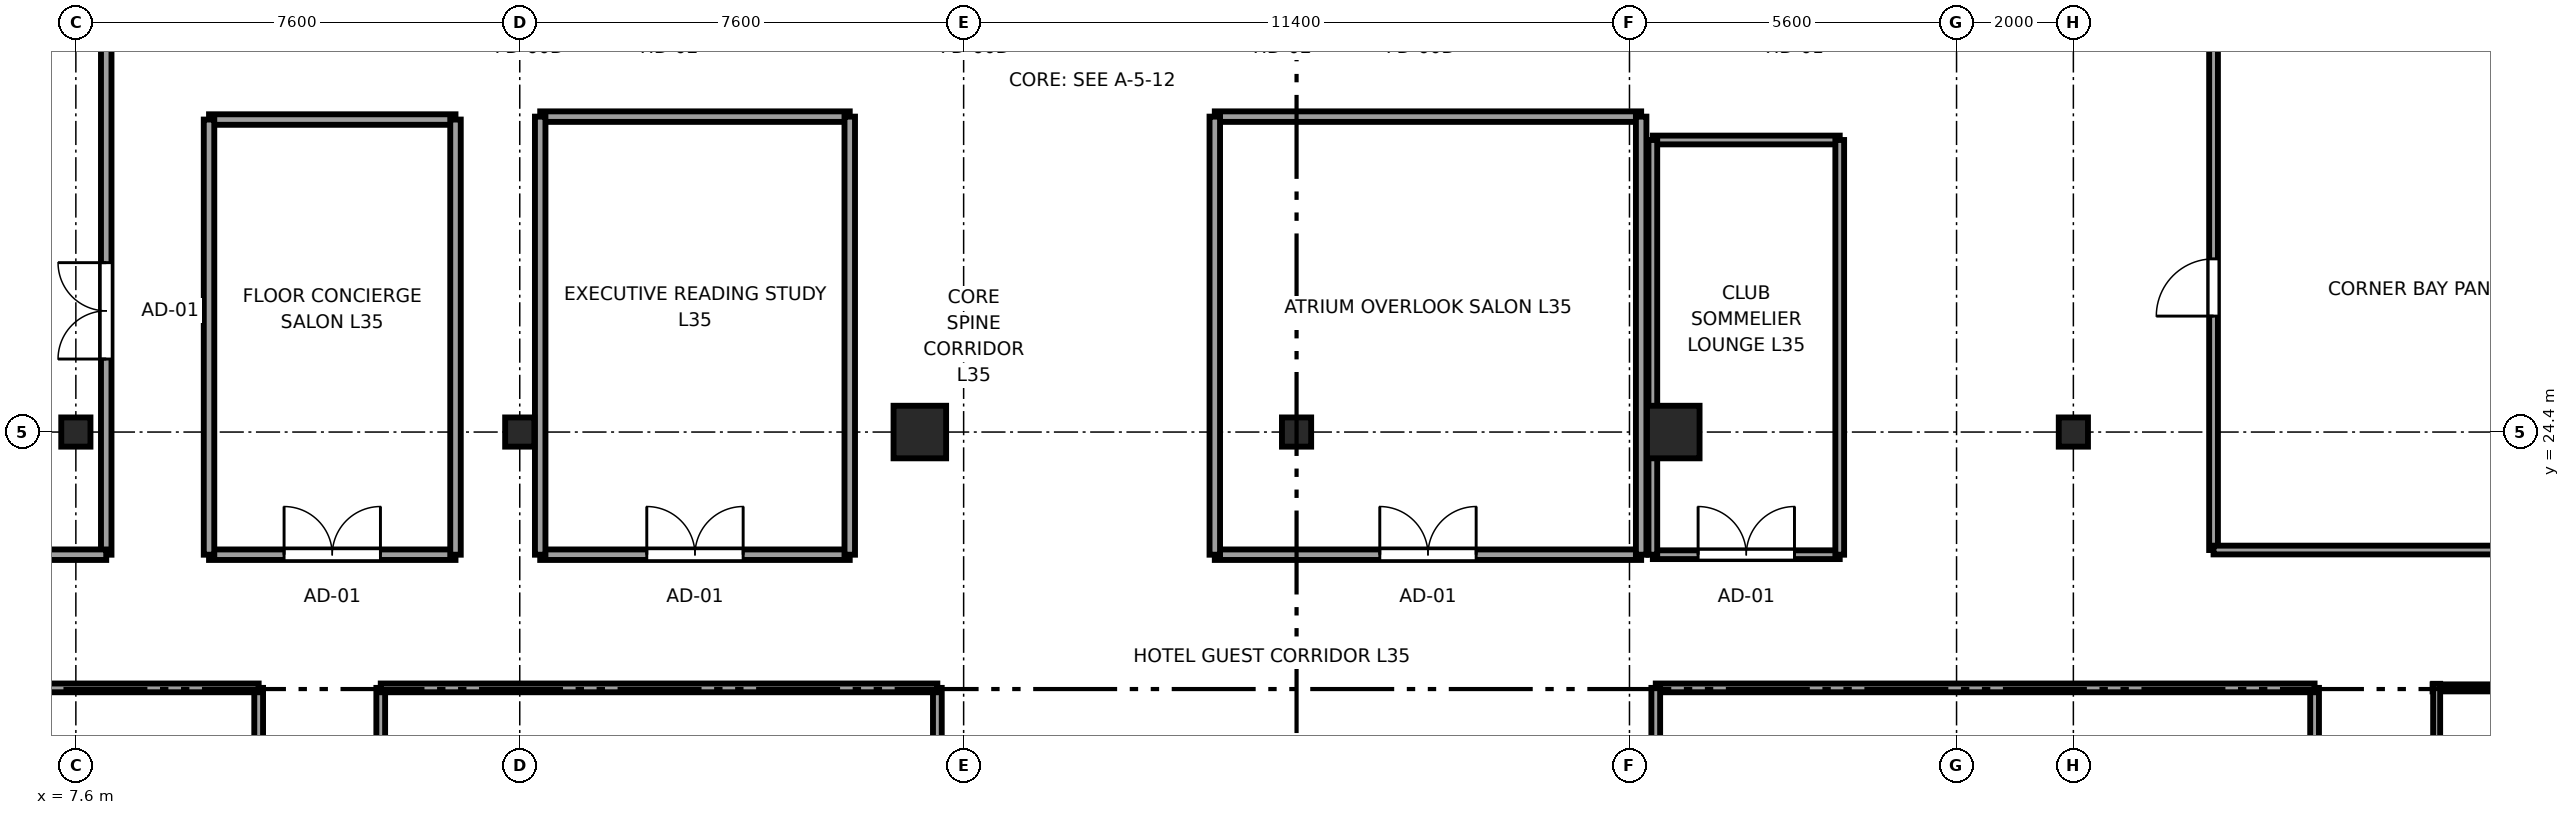
"""IFC4 building model, lengths in metres.
Left out: names, types, materials, properties, quantities, classifications, styles, units other than length and angle.
Written with IfcOpenShell. Run it as: python <this file> out.ifc"""

import sys

from ifc_helpers import new_model, si_unit, direction, frame, frame_2d, origin, origin_2d, place, context, subcontext, project, spatial, rectangle, i_section, extrude, source, transform, mapped, element, fill, save


model = new_model("IFC4")
c1 = context("Model", 3, precision=1e-05, world=origin(), true_north=direction((0.0, 1.0)))
c2 = subcontext(c1, "Body", "Model", "MODEL_VIEW")
j1 = project(units=[si_unit("LENGTHUNIT", "METRE"), si_unit("PLANEANGLEUNIT", "RADIAN")], contexts=[c1])
p1 = place(None, origin())
s1 = spatial("IfcSite", under=j1, at=p1, CompositionType="ELEMENT")
p2 = place(p1, origin())
s2 = spatial("IfcBuilding", under=s1, at=p2, CompositionType="ELEMENT")
p3 = place(p2, frame((0.0, 0.0, 136.4)))
s3 = spatial("IfcBuildingStorey", under=s2, at=p3, CompositionType="ELEMENT", Elevation=136.4)
m1 = source(origin(), c2, "Body", "SweptSolid", [
    extrude(i_section(OverallWidth=0.5, OverallDepth=0.5, WebThickness=0.022, FlangeThickness=0.034, at=origin_2d()), origin(), (0.0, 0.0, 1.0), 3.55),
])
for number, where, z_axis, x_axis in (
    (1, (7.6, 24.4, 0.0), (0.0, 0.0, 1.0), (1.0, 0.0, 0.0)),
    (2, (15.2, 24.4, 0.0), (0.0, 0.0, 1.0), (1.0, 0.0, 0.0)),
):
    element("IfcColumn", number, at=place(p3, frame(where, z_axis=z_axis, x_axis=x_axis)), inside=s3, PredefinedType="COLUMN", context=c2, shape_type="MappedRepresentation", body=[
        mapped(m1, transform((0.0, 0.0, 0.0), x_axis=(1.0, 0.0, 0.0), y_axis=(0.0, 1.0, 0.0), z_axis=(0.0, 0.0, 1.0), scale=1.0)),
    ])
m2 = source(origin(), c2, "Body", "SweptSolid", [
    extrude(rectangle(XDim=0.9, YDim=0.9, at=origin_2d()), origin(), (0.0, 0.0, 1.0), 3.55),
])
for number, where, z_axis, x_axis in (
    (3, (22.05, 24.4, 0.0), (0.0, 0.0, 1.0), (1.0, 0.0, 0.0)),
    (4, (34.95, 24.4, 0.0), (0.0, 0.0, 1.0), (1.0, 0.0, 0.0)),
):
    element("IfcColumn", number, at=place(p3, frame(where, z_axis=z_axis, x_axis=x_axis)), inside=s3, PredefinedType="COLUMN", context=c2, shape_type="MappedRepresentation", body=[
        mapped(m2, transform((0.0, 0.0, 0.0), x_axis=(1.0, 0.0, 0.0), y_axis=(0.0, 1.0, 0.0), z_axis=(0.0, 0.0, 1.0), scale=1.0)),
    ])
for number, where, z_axis, x_axis in (
    (5, (41.8, 24.4, 0.0), (0.0, 0.0, 1.0), (1.0, 0.0, 0.0)),
    (6, (28.5, 24.4, 0.0), (0.0, 0.0, 1.0), (1.0, 0.0, 0.0)),
):
    element("IfcColumn", number, at=place(p3, frame(where, z_axis=z_axis, x_axis=x_axis)), inside=s3, PredefinedType="COLUMN", context=c2, shape_type="MappedRepresentation", body=[
        mapped(m1, transform((0.0, 0.0, 0.0), x_axis=(1.0, 0.0, 0.0), y_axis=(0.0, 1.0, 0.0), z_axis=(0.0, 0.0, 1.0), scale=1.0)),
    ])
p4 = place(p3, frame((47.95, 20.02, 0.0), z_axis=(0.0, 0.0, 1.0), x_axis=(1.0, 0.0, 0.0)))
e7 = element("IfcWall", 7, at=p4, inside=s3, PredefinedType="PLUMBINGWALL", context=c2, shape_type="SweptSolid", body=[
    extrude(rectangle(XDim=2.59, YDim=0.12, at=frame_2d((1.295, 0.0))), origin(), (0.0, 0.0, 1.0), 3.37),
])
p5 = place(p3, frame((48.02, 17.997, 0.0), z_axis=(0.0, 0.0, 1.0), x_axis=(0.0, 1.0, 0.0)))
e8 = element("IfcWall", 8, at=p5, inside=s3, PredefinedType="PLUMBINGWALL", context=c2, shape_type="SweptSolid", body=[
    extrude(rectangle(XDim=2.093, YDim=0.12, at=frame_2d((1.046, 0.0))), origin(), (0.0, 0.0, 1.0), 3.37),
])
p6 = place(p3, frame((10.73, 17.037, 0.0), z_axis=(0.0, 0.0, 1.0), x_axis=(0.0, 1.0, 0.0)))
e9 = element("IfcWall", 9, at=p6, inside=s3, PredefinedType="PARTITIONING", context=c2, shape_type="SweptSolid", body=[
    extrude(rectangle(XDim=2.983, YDim=0.15, at=frame_2d((1.491, 0.0))), origin(), (0.0, 0.0, 1.0), 3.37),
])
p7 = place(p6, frame((0.981, 0.0, 0.0)))
e10 = element("IfcOpeningElement", 10, at=p7, cuts=e9, PredefinedType="OPENING", context=c2, shape_type="SweptSolid", body=[
    extrude(rectangle(XDim=0.98, YDim=2.12, at=frame_2d((0.49, 1.06))), frame((0.0, 0.085, 0.0), z_axis=(0.0, -1.0, 0.0), x_axis=(1.0, 0.0, 0.0)), (0.0, 0.0, 1.0), 0.17),
])
p8 = place(p3, frame((0.405, 20.02, 0.0), z_axis=(0.0, 0.0, 1.0), x_axis=(1.0, 0.0, 0.0)))
e11 = element("IfcWall", 11, at=p8, inside=s3, PredefinedType="PARTITIONING", context=c2, shape_type="SweptSolid", body=[
    extrude(rectangle(XDim=10.325, YDim=0.15, at=frame_2d((5.163, 0.0))), origin(), (0.0, 0.0, 1.0), 3.37),
])
p9 = place(p3, frame((12.82, 15.81, 0.0), z_axis=(0.0, 0.0, 1.0), x_axis=(0.0, 1.0, 0.0)))
e12 = element("IfcWall", 12, at=p9, inside=s3, PredefinedType="PARTITIONING", context=c2, shape_type="SweptSolid", body=[
    extrude(rectangle(XDim=4.21, YDim=0.15, at=frame_2d((2.105, 0.0))), origin(), (0.0, 0.0, 1.0), 3.37),
])
p10 = place(p9, frame((1.595, 0.0, 0.0)))
e13 = element("IfcOpeningElement", 13, at=p10, cuts=e12, PredefinedType="OPENING", context=c2, shape_type="SweptSolid", body=[
    extrude(rectangle(XDim=0.98, YDim=2.12, at=frame_2d((0.49, 1.06))), frame((0.0, 0.085, 0.0), z_axis=(0.0, -1.0, 0.0), x_axis=(1.0, 0.0, 0.0)), (0.0, 0.0, 1.0), 0.17),
])
p11 = place(p3, frame((22.35, 13.48, 0.0), z_axis=(0.0, 0.0, 1.0), x_axis=(0.0, 1.0, 0.0)))
e14 = element("IfcWall", 14, at=p11, inside=s3, PredefinedType="PARTITIONING", context=c2, shape_type="SweptSolid", body=[
    extrude(rectangle(XDim=6.54, YDim=0.15, at=frame_2d((3.27, 0.0))), origin(), (0.0, 0.0, 1.0), 3.37),
])
p12 = place(p3, frame((12.82, 20.02, 0.0), z_axis=(0.0, 0.0, 1.0), x_axis=(1.0, 0.0, 0.0)))
e15 = element("IfcWall", 15, at=p12, inside=s3, PredefinedType="PARTITIONING", context=c2, shape_type="SweptSolid", body=[
    extrude(rectangle(XDim=9.53, YDim=0.15, at=frame_2d((4.765, 0.0))), origin(), (0.0, 0.0, 1.0), 2.954),
])
p13 = place(p3, frame((45.93, 15.81, 0.0), z_axis=(0.0, 0.0, 1.0), x_axis=(0.0, 1.0, 0.0)))
e16 = element("IfcWall", 16, at=p13, inside=s3, PredefinedType="PARTITIONING", context=c2, shape_type="SweptSolid", body=[
    extrude(rectangle(XDim=4.21, YDim=0.15, at=frame_2d((2.105, 0.0))), origin(), (0.0, 0.0, 1.0), 3.37),
])
p14 = place(p13, frame((1.595, 0.0, 0.0)))
e17 = element("IfcOpeningElement", 17, at=p14, cuts=e16, PredefinedType="OPENING", context=c2, shape_type="SweptSolid", body=[
    extrude(rectangle(XDim=0.98, YDim=2.12, at=frame_2d((0.49, 1.06))), frame((0.0, 0.085, 0.0), z_axis=(0.0, -1.0, 0.0), x_axis=(1.0, 0.0, 0.0)), (0.0, 0.0, 1.0), 0.17),
])
p15 = place(p3, frame((34.65, 20.02, 0.0), z_axis=(0.0, 0.0, 1.0), x_axis=(1.0, 0.0, 0.0)))
e18 = element("IfcWall", 18, at=p15, inside=s3, PredefinedType="PARTITIONING", context=c2, shape_type="SweptSolid", body=[
    extrude(rectangle(XDim=11.28, YDim=0.15, at=frame_2d((5.64, 0.0))), origin(), (0.0, 0.0, 1.0), 2.954),
])
p16 = place(p3, frame((34.65, 13.48, 0.0), z_axis=(0.0, 0.0, 1.0), x_axis=(0.0, 1.0, 0.0)))
e19 = element("IfcWall", 19, at=p16, inside=s3, PredefinedType="PARTITIONING", context=c2, shape_type="SweptSolid", body=[
    extrude(rectangle(XDim=6.54, YDim=0.15, at=frame_2d((3.27, 0.0))), origin(), (0.0, 0.0, 1.0), 3.37),
])
p17 = place(p3, frame((8.12, 22.3, 0.0), z_axis=(0.0, 0.0, 1.0), x_axis=(0.0, 1.0, 0.0)))
e20 = element("IfcWall", 20, at=p17, inside=s3, PredefinedType="PARTITIONING", context=c2, shape_type="SweptSolid", body=[
    extrude(rectangle(XDim=13.5, YDim=0.18, at=frame_2d((6.75, 0.0))), origin(), (0.0, 0.0, 1.0), 3.37),
])
p18 = place(p17, frame((3.35, 0.0, 0.0)))
e21 = element("IfcOpeningElement", 21, at=p18, cuts=e20, PredefinedType="OPENING", context=c2, shape_type="SweptSolid", body=[
    extrude(rectangle(XDim=1.65, YDim=2.15, at=frame_2d((0.825, 1.075))), frame((0.0, 0.1, 0.0), z_axis=(0.0, -1.0, 0.0), x_axis=(1.0, 0.0, 0.0)), (0.0, 0.0, 1.0), 0.2),
])
p19 = place(p3, frame((0.405, 22.3, 0.0), z_axis=(0.0, 0.0, 1.0), x_axis=(1.0, 0.0, 0.0)))
e22 = element("IfcWall", 22, at=p19, inside=s3, PredefinedType="PARTITIONING", context=c2, shape_type="SweptSolid", body=[
    extrude(rectangle(XDim=7.715, YDim=0.18, at=frame_2d((3.857, 0.0))), origin(), (0.0, 0.0, 1.0), 3.37),
])
p20 = place(p3, frame((44.2, 22.38, 0.0), z_axis=(0.0, 0.0, 1.0), x_axis=(0.0, 1.0, 0.0)))
e23 = element("IfcWall", 23, at=p20, inside=s3, PredefinedType="PARTITIONING", context=c2, shape_type="SweptSolid", body=[
    extrude(rectangle(XDim=8.99, YDim=0.15, at=frame_2d((4.495, 0.0))), origin(), (0.0, 0.0, 1.0), 3.37),
])
p21 = place(p20, frame((4.005, 0.0, 0.0)))
e24 = element("IfcOpeningElement", 24, at=p21, cuts=e23, PredefinedType="OPENING", context=c2, shape_type="SweptSolid", body=[
    extrude(rectangle(XDim=0.98, YDim=2.12, at=frame_2d((0.49, 1.06))), frame((0.0, 0.085, 0.0), z_axis=(0.0, -1.0, 0.0), x_axis=(1.0, 0.0, 0.0)), (0.0, 0.0, 1.0), 0.17),
])
p22 = place(p3, frame((44.2, 22.38, 0.0), z_axis=(0.0, 0.0, 1.0), x_axis=(1.0, 0.0, 0.0)))
e25 = element("IfcWall", 25, at=p22, inside=s3, PredefinedType="PARTITIONING", context=c2, shape_type="SweptSolid", body=[
    extrude(rectangle(XDim=12.395, YDim=0.15, at=frame_2d((6.198, 0.0))), origin(), (0.0, 0.0, 1.0), 3.37),
])
p23 = place(p3, frame((9.88, 22.3, 0.0), z_axis=(0.0, 0.0, 1.0), x_axis=(1.0, 0.0, 0.0)))
e26 = element("IfcWall", 26, at=p23, inside=s3, PredefinedType="PARTITIONING", context=c2, shape_type="SweptSolid", body=[
    extrude(rectangle(XDim=4.22, YDim=0.18, at=frame_2d((2.11, 0.0))), origin(), (0.0, 0.0, 1.0), 3.37),
])
p24 = place(p23, frame((1.285, 0.0, 0.0)))
e27 = element("IfcOpeningElement", 27, at=p24, cuts=e26, PredefinedType="OPENING", context=c2, shape_type="SweptSolid", body=[
    extrude(rectangle(XDim=1.65, YDim=2.15, at=frame_2d((0.825, 1.075))), frame((0.0, 0.1, 0.0), z_axis=(0.0, -1.0, 0.0), x_axis=(1.0, 0.0, 0.0)), (0.0, 0.0, 1.0), 0.2),
])
p25 = place(p3, frame((9.88, 29.75, 0.0), z_axis=(0.0, 0.0, 1.0), x_axis=(1.0, 0.0, 0.0)))
e28 = element("IfcWall", 28, at=p25, inside=s3, PredefinedType="PARTITIONING", context=c2, shape_type="SweptSolid", body=[
    extrude(rectangle(XDim=4.22, YDim=0.18, at=frame_2d((2.11, 0.0))), origin(), (0.0, 0.0, 1.0), 3.37),
])
for number, where, z_axis, x_axis in (
    (29, (9.88, 22.3, 0.0), (0.0, 0.0, 1.0), (0.0, 1.0, 0.0)),
    (30, (14.1, 22.3, 0.0), (0.0, 0.0, 1.0), (0.0, 1.0, 0.0)),
):
    element("IfcWall", number, at=place(p3, frame(where, z_axis=z_axis, x_axis=x_axis)), inside=s3, PredefinedType="PARTITIONING", context=c2, shape_type="SweptSolid", body=[
        extrude(rectangle(XDim=7.45, YDim=0.18, at=frame_2d((3.725, 0.0))), origin(), (0.0, 0.0, 1.0), 3.37),
    ])
p26 = place(p3, frame((27.1, 22.3, 0.0), z_axis=(0.0, 0.0, 1.0), x_axis=(1.0, 0.0, 0.0)))
e31 = element("IfcWall", 31, at=p26, inside=s3, PredefinedType="PARTITIONING", context=c2, shape_type="SweptSolid", body=[
    extrude(rectangle(XDim=7.3, YDim=0.18, at=frame_2d((3.65, 0.0))), origin(), (0.0, 0.0, 1.0), 3.37),
])
p27 = place(p26, frame((2.825, 0.0, 0.0)))
e32 = element("IfcOpeningElement", 32, at=p27, cuts=e31, PredefinedType="OPENING", context=c2, shape_type="SweptSolid", body=[
    extrude(rectangle(XDim=1.65, YDim=2.15, at=frame_2d((0.825, 1.075))), frame((0.0, 0.1, 0.0), z_axis=(0.0, -1.0, 0.0), x_axis=(1.0, 0.0, 0.0)), (0.0, 0.0, 1.0), 0.2),
])
p28 = place(p3, frame((27.1, 29.8, 0.0), z_axis=(0.0, 0.0, 1.0), x_axis=(1.0, 0.0, 0.0)))
e33 = element("IfcWall", 33, at=p28, inside=s3, PredefinedType="PARTITIONING", context=c2, shape_type="SweptSolid", body=[
    extrude(rectangle(XDim=7.3, YDim=0.18, at=frame_2d((3.65, 0.0))), origin(), (0.0, 0.0, 1.0), 3.37),
])
for number, where, z_axis, x_axis in (
    (34, (27.1, 22.3, 0.0), (0.0, 0.0, 1.0), (0.0, 1.0, 0.0)),
    (35, (34.4, 22.3, 0.0), (0.0, 0.0, 1.0), (0.0, 1.0, 0.0)),
):
    element("IfcWall", number, at=place(p3, frame(where, z_axis=z_axis, x_axis=x_axis)), inside=s3, PredefinedType="PARTITIONING", context=c2, shape_type="SweptSolid", body=[
        extrude(rectangle(XDim=7.5, YDim=0.18, at=frame_2d((3.75, 0.0))), origin(), (0.0, 0.0, 1.0), 3.37),
    ])
p29 = place(p3, frame((15.55, 22.3, 0.0), z_axis=(0.0, 0.0, 1.0), x_axis=(1.0, 0.0, 0.0)))
e36 = element("IfcWall", 36, at=p29, inside=s3, PredefinedType="PARTITIONING", context=c2, shape_type="SweptSolid", body=[
    extrude(rectangle(XDim=5.3, YDim=0.18, at=frame_2d((2.65, 0.0))), origin(), (0.0, 0.0, 1.0), 3.37),
])
p30 = place(p29, frame((1.825, 0.0, 0.0)))
e37 = element("IfcOpeningElement", 37, at=p30, cuts=e36, PredefinedType="OPENING", context=c2, shape_type="SweptSolid", body=[
    extrude(rectangle(XDim=1.65, YDim=2.15, at=frame_2d((0.825, 1.075))), frame((0.0, 0.1, 0.0), z_axis=(0.0, -1.0, 0.0), x_axis=(1.0, 0.0, 0.0)), (0.0, 0.0, 1.0), 0.2),
])
p31 = place(p3, frame((15.55, 29.8, 0.0), z_axis=(0.0, 0.0, 1.0), x_axis=(1.0, 0.0, 0.0)))
e38 = element("IfcWall", 38, at=p31, inside=s3, PredefinedType="PARTITIONING", context=c2, shape_type="SweptSolid", body=[
    extrude(rectangle(XDim=5.3, YDim=0.18, at=frame_2d((2.65, 0.0))), origin(), (0.0, 0.0, 1.0), 3.37),
])
for number, where, z_axis, x_axis in (
    (39, (15.55, 22.3, 0.0), (0.0, 0.0, 1.0), (0.0, 1.0, 0.0)),
    (40, (20.85, 22.3, 0.0), (0.0, 0.0, 1.0), (0.0, 1.0, 0.0)),
):
    element("IfcWall", number, at=place(p3, frame(where, z_axis=z_axis, x_axis=x_axis)), inside=s3, PredefinedType="PARTITIONING", context=c2, shape_type="SweptSolid", body=[
        extrude(rectangle(XDim=7.5, YDim=0.18, at=frame_2d((3.75, 0.0))), origin(), (0.0, 0.0, 1.0), 3.37),
    ])
p32 = place(p3, frame((34.6, 22.3, 0.0), z_axis=(0.0, 0.0, 1.0), x_axis=(1.0, 0.0, 0.0)))
e41 = element("IfcWall", 41, at=p32, inside=s3, PredefinedType="PARTITIONING", context=c2, shape_type="SweptSolid", body=[
    extrude(rectangle(XDim=3.2, YDim=0.15, at=frame_2d((1.6, 0.0))), origin(), (0.0, 0.0, 1.0), 3.37),
])
p33 = place(p32, frame((0.775, 0.0, 0.0)))
e42 = element("IfcOpeningElement", 42, at=p33, cuts=e41, PredefinedType="OPENING", context=c2, shape_type="SweptSolid", body=[
    extrude(rectangle(XDim=1.65, YDim=2.15, at=frame_2d((0.825, 1.075))), frame((0.0, 0.085, 0.0), z_axis=(0.0, -1.0, 0.0), x_axis=(1.0, 0.0, 0.0)), (0.0, 0.0, 1.0), 0.17),
])
p34 = place(p3, frame((34.6, 29.4, 0.0), z_axis=(0.0, 0.0, 1.0), x_axis=(1.0, 0.0, 0.0)))
e43 = element("IfcWall", 43, at=p34, inside=s3, PredefinedType="PARTITIONING", context=c2, shape_type="SweptSolid", body=[
    extrude(rectangle(XDim=3.2, YDim=0.15, at=frame_2d((1.6, 0.0))), origin(), (0.0, 0.0, 1.0), 3.37),
])
for number, where, z_axis, x_axis in (
    (44, (34.6, 22.3, 0.0), (0.0, 0.0, 1.0), (0.0, 1.0, 0.0)),
    (45, (37.8, 22.3, 0.0), (0.0, 0.0, 1.0), (0.0, 1.0, 0.0)),
):
    element("IfcWall", number, at=place(p3, frame(where, z_axis=z_axis, x_axis=x_axis)), inside=s3, PredefinedType="PARTITIONING", context=c2, shape_type="SweptSolid", body=[
        extrude(rectangle(XDim=7.1, YDim=0.15, at=frame_2d((3.55, 0.0))), origin(), (0.0, 0.0, 1.0), 3.37),
    ])
m3 = source(origin(), c2, "Body", "SweptSolid", [
    extrude(rectangle(XDim=1.65, YDim=2.15, at=frame_2d((0.825, 1.075))), frame((0.0, 0.025, 0.0), z_axis=(0.0, -1.0, 0.0), x_axis=(1.0, 0.0, 0.0)), (0.0, 0.0, 1.0), 0.05),
])
p35 = place(p18, origin())
e46 = element("IfcDoor", 46, at=p35, inside=s3, OperationType="DOUBLE_DOOR_SINGLE_SWING", PredefinedType="DOOR", context=c2, shape_type="MappedRepresentation", body=[
    mapped(m3, transform((0.0, 0.0, 0.0), x_axis=(1.0, 0.0, 0.0), y_axis=(0.0, 1.0, 0.0), z_axis=(0.0, 0.0, 1.0), scale=1.0)),
])
fill(e21, e46)
m4 = source(origin(), c2, "Body", "SweptSolid", [
    extrude(rectangle(XDim=0.98, YDim=2.12, at=frame_2d((0.49, 1.06))), frame((0.0, 0.025, 0.0), z_axis=(0.0, -1.0, 0.0), x_axis=(1.0, 0.0, 0.0)), (0.0, 0.0, 1.0), 0.05),
])
p36 = place(p21, origin())
e47 = element("IfcDoor", 47, at=p36, inside=s3, OperationType="SINGLE_SWING_LEFT", PredefinedType="DOOR", context=c2, shape_type="MappedRepresentation", body=[
    mapped(m4, transform((0.0, 0.0, 0.0), x_axis=(1.0, 0.0, 0.0), y_axis=(0.0, 1.0, 0.0), z_axis=(0.0, 0.0, 1.0), scale=1.0)),
])
fill(e24, e47)
p37 = place(p24, origin())
e48 = element("IfcDoor", 48, at=p37, inside=s3, OperationType="DOUBLE_DOOR_SINGLE_SWING", PredefinedType="DOOR", context=c2, shape_type="MappedRepresentation", body=[
    mapped(m3, transform((0.0, 0.0, 0.0), x_axis=(1.0, 0.0, 0.0), y_axis=(0.0, 1.0, 0.0), z_axis=(0.0, 0.0, 1.0), scale=1.0)),
])
fill(e27, e48)
p38 = place(p27, origin())
e49 = element("IfcDoor", 49, at=p38, inside=s3, OperationType="DOUBLE_DOOR_SINGLE_SWING", PredefinedType="DOOR", context=c2, shape_type="MappedRepresentation", body=[
    mapped(m3, transform((0.0, 0.0, 0.0), x_axis=(1.0, 0.0, 0.0), y_axis=(0.0, 1.0, 0.0), z_axis=(0.0, 0.0, 1.0), scale=1.0)),
])
fill(e32, e49)
p39 = place(p30, origin())
e50 = element("IfcDoor", 50, at=p39, inside=s3, OperationType="DOUBLE_DOOR_SINGLE_SWING", PredefinedType="DOOR", context=c2, shape_type="MappedRepresentation", body=[
    mapped(m3, transform((0.0, 0.0, 0.0), x_axis=(1.0, 0.0, 0.0), y_axis=(0.0, 1.0, 0.0), z_axis=(0.0, 0.0, 1.0), scale=1.0)),
])
fill(e37, e50)
p40 = place(p33, origin())
e51 = element("IfcDoor", 51, at=p40, inside=s3, OperationType="DOUBLE_DOOR_SINGLE_SWING", PredefinedType="DOOR", context=c2, shape_type="MappedRepresentation", body=[
    mapped(m3, transform((0.0, 0.0, 0.0), x_axis=(1.0, 0.0, 0.0), y_axis=(0.0, 1.0, 0.0), z_axis=(0.0, 0.0, 1.0), scale=1.0)),
])
fill(e42, e51)
save(model, sys.argv[1])
